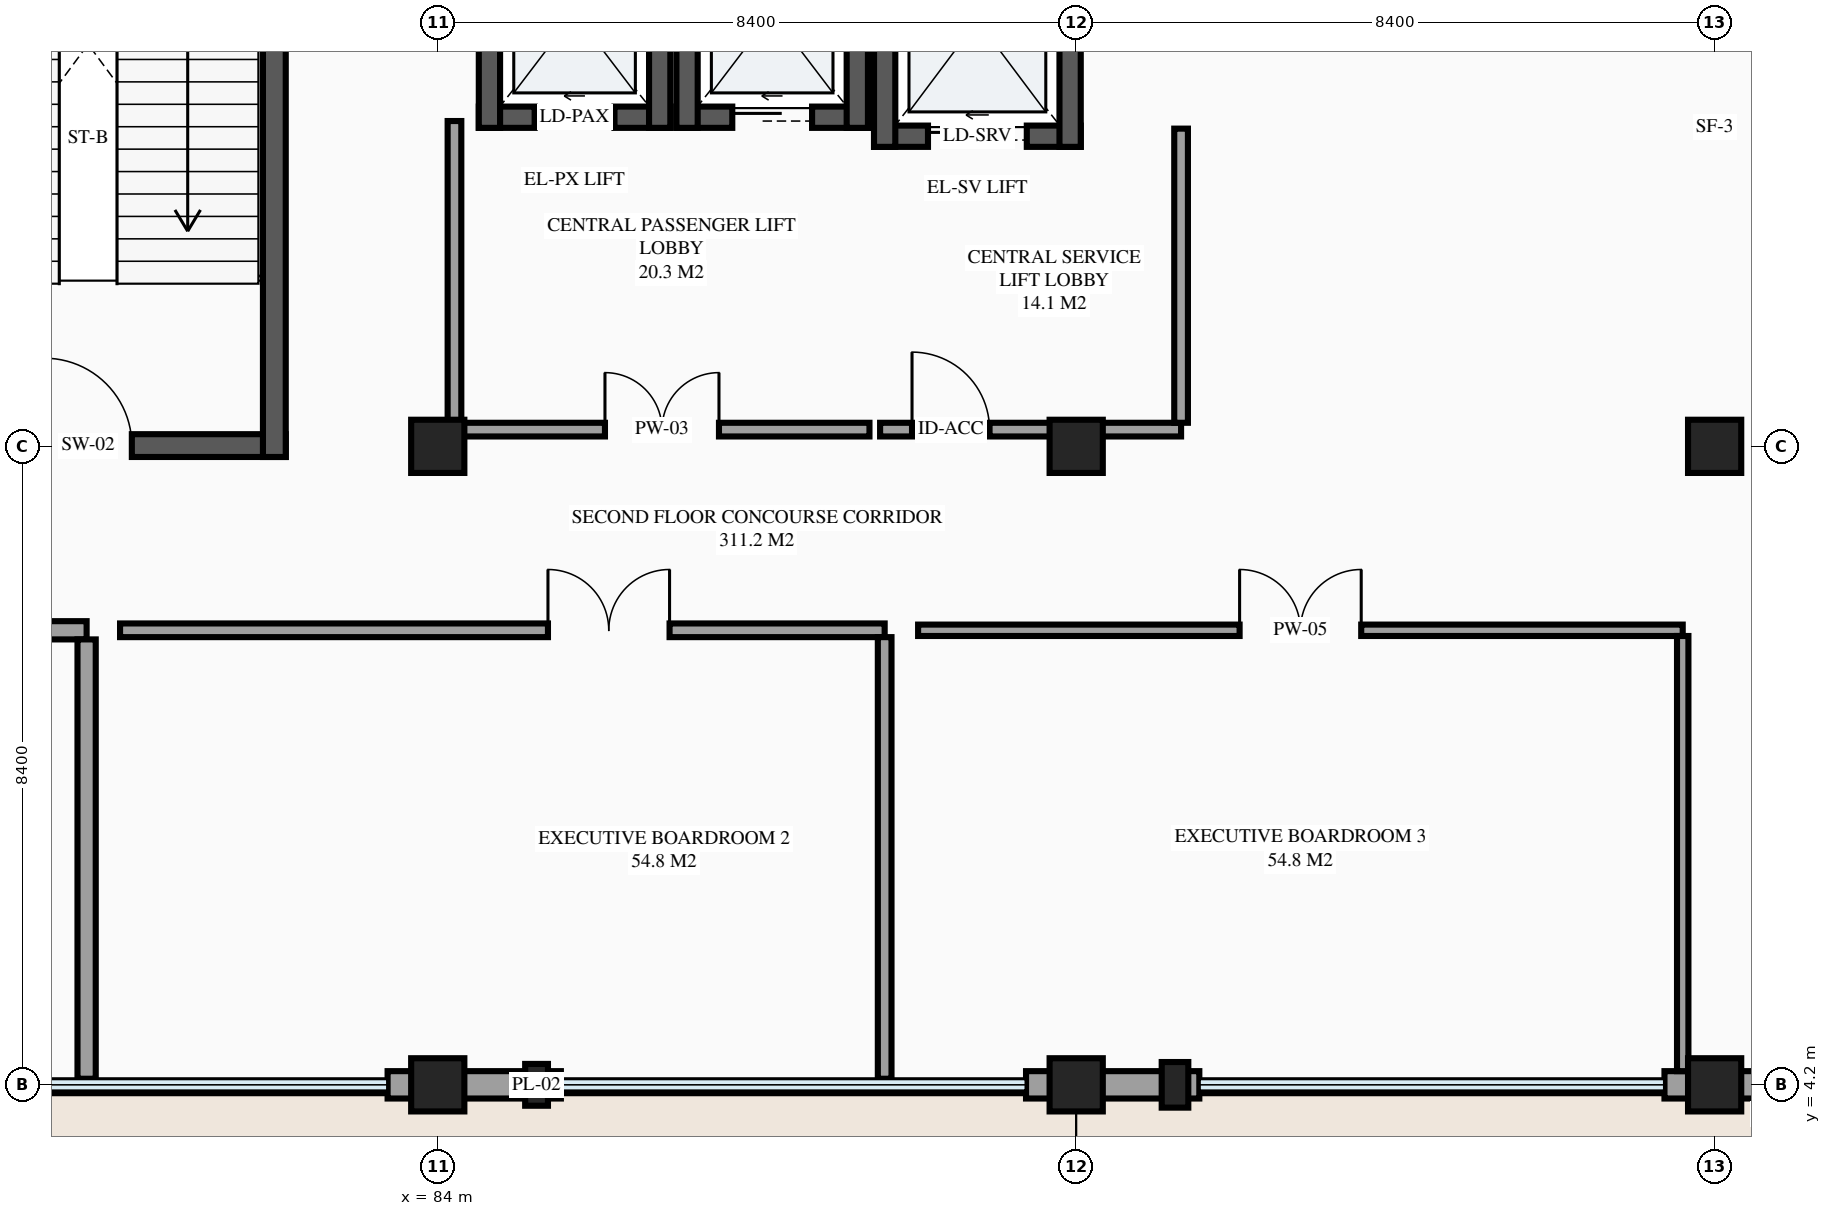
"""IFC4 building model, lengths in metres.
Left out: names, types, materials, properties, quantities, classifications, styles, units other than length and angle.
Written with IfcOpenShell. Run it as: python <this file> out.ifc"""

import sys

from ifc_helpers import new_model, si_unit, direction, frame, frame_2d, origin, origin_2d, place, context, subcontext, project, spatial, rectangle, extrude, element, fill, save


model = new_model("IFC4")
c1 = context("Model", 3, precision=1e-05, world=origin(), true_north=direction((0.0, 1.0)))
c2 = subcontext(c1, "Body", "Model", "MODEL_VIEW")
j1 = project(units=[si_unit("LENGTHUNIT", "METRE"), si_unit("PLANEANGLEUNIT", "RADIAN")], contexts=[c1])
p1 = place(None, origin())
s1 = spatial("IfcSite", under=j1, at=p1, CompositionType="ELEMENT")
p2 = place(p1, origin())
s2 = spatial("IfcBuilding", under=s1, at=p2, CompositionType="ELEMENT")
p3 = place(p2, frame((0.0, 0.0, 9.9)))
s3 = spatial("IfcBuildingStorey", under=s2, at=p3, CompositionType="ELEMENT", Elevation=9.9)
for number, where, z_axis, x_axis in (
    (1, (84.0, 4.2, 0.0), (0.0, 0.0, 1.0), (1.0, 0.0, 0.0)),
    (2, (84.0, 12.6, 0.0), (0.0, 0.0, 1.0), (1.0, 0.0, 0.0)),
    (3, (92.4, 4.2, 0.0), (0.0, 0.0, 1.0), (1.0, 0.0, 0.0)),
    (4, (92.4, 12.6, 0.0), (0.0, 0.0, 1.0), (1.0, 0.0, 0.0)),
    (5, (100.8, 4.2, 0.0), (0.0, 0.0, 1.0), (1.0, 0.0, 0.0)),
    (6, (100.8, 12.6, 0.0), (0.0, 0.0, 1.0), (1.0, 0.0, 0.0)),
):
    element("IfcColumn", number, at=place(p3, frame(where, z_axis=z_axis, x_axis=x_axis)), inside=s3, PredefinedType="COLUMN", context=c2, shape_type="SweptSolid", body=[
        extrude(rectangle(XDim=0.7, YDim=0.7, at=origin_2d()), origin(), (0.0, 0.0, 1.0), 4.2),
    ])
p4 = place(p3, frame((85.3, 4.2, 0.0), z_axis=(0.0, 0.0, 1.0), x_axis=(1.0, 0.0, 0.0)))
e7 = element("IfcColumn", 7, at=p4, inside=s3, PredefinedType="PILASTER", context=c2, shape_type="SweptSolid", body=[
    extrude(rectangle(XDim=0.3, YDim=0.55, at=origin_2d()), origin(), (0.0, 0.0, 1.0), 4.2),
])
p5 = place(p3, frame((93.7, 4.2, 0.0), z_axis=(0.0, 0.0, 1.0), x_axis=(1.0, 0.0, 0.0)))
e8 = element("IfcColumn", 8, at=p5, inside=s3, PredefinedType="PILASTER", context=c2, shape_type="SweptSolid", body=[
    extrude(rectangle(XDim=0.35, YDim=0.6, at=origin_2d()), origin(), (0.0, 0.0, 1.0), 4.2),
])
p6 = place(p3, frame((83.34, 4.2, 0.0), z_axis=(0.0, 0.0, 1.0), x_axis=(1.0, 0.0, 0.0)))
e9 = element("IfcWall", 9, at=p6, inside=s3, PredefinedType="STANDARD", context=c2, shape_type="SweptSolid", body=[
    extrude(rectangle(XDim=0.66, YDim=0.36, at=frame_2d((0.33, 0.0))), origin(), (0.0, 0.0, 1.0), 4.2),
])
p7 = place(p3, frame((84.0, 4.2, 0.0), z_axis=(0.0, 0.0, 1.0), x_axis=(1.0, 0.0, 0.0)))
e10 = element("IfcWall", 10, at=p7, inside=s3, PredefinedType="STANDARD", context=c2, shape_type="SweptSolid", body=[
    extrude(rectangle(XDim=1.62, YDim=0.36, at=frame_2d((0.81, 0.0))), origin(), (0.0, 0.0, 1.0), 3.21),
])
p8 = place(p3, frame((91.74, 4.2, 0.0), z_axis=(0.0, 0.0, 1.0), x_axis=(1.0, 0.0, 0.0)))
e11 = element("IfcWall", 11, at=p8, inside=s3, PredefinedType="STANDARD", context=c2, shape_type="SweptSolid", body=[
    extrude(rectangle(XDim=0.66, YDim=0.36, at=frame_2d((0.33, 0.0))), origin(), (0.0, 0.0, 1.0), 4.2),
])
p9 = place(p3, frame((92.4, 4.2, 0.0), z_axis=(0.0, 0.0, 1.0), x_axis=(1.0, 0.0, 0.0)))
e12 = element("IfcWall", 12, at=p9, inside=s3, PredefinedType="STANDARD", context=c2, shape_type="SweptSolid", body=[
    extrude(rectangle(XDim=1.62, YDim=0.36, at=frame_2d((0.81, 0.0))), origin(), (0.0, 0.0, 1.0), 3.65),
])
p10 = place(p3, frame((100.14, 4.2, 0.0), z_axis=(0.0, 0.0, 1.0), x_axis=(1.0, 0.0, 0.0)))
e13 = element("IfcWall", 13, at=p10, inside=s3, PredefinedType="STANDARD", context=c2, shape_type="SweptSolid", body=[
    extrude(rectangle(XDim=0.66, YDim=0.36, at=frame_2d((0.33, 0.0))), origin(), (0.0, 0.0, 1.0), 4.2),
])
p11 = place(p3, frame((100.8, 4.2, 0.0), z_axis=(0.0, 0.0, 1.0), x_axis=(1.0, 0.0, 0.0)))
e14 = element("IfcWall", 14, at=p11, inside=s3, PredefinedType="STANDARD", context=c2, shape_type="SweptSolid", body=[
    extrude(rectangle(XDim=8.4, YDim=0.36, at=frame_2d((4.2, 0.0))), origin(), (0.0, 0.0, 1.0), 3.431),
])
p12 = place(p11, frame((3.6, 0.0, 0.75)))
e15 = element("IfcOpeningElement", 15, at=p12, cuts=e14, PredefinedType="OPENING", context=c2, shape_type="SweptSolid", body=[
    extrude(rectangle(XDim=1.2, YDim=1.5, at=frame_2d((0.6, 0.75))), frame((0.0, 0.19, 0.0), z_axis=(0.0, -1.0, 0.0), x_axis=(1.0, 0.0, 0.0)), (0.0, 0.0, 1.0), 0.38),
])
p13 = place(p3, frame((84.54, 16.93, 0.0), z_axis=(0.0, 0.0, 1.0), x_axis=(1.0, 0.0, 0.0)))
e16 = element("IfcWall", 16, at=p13, inside=s3, PredefinedType="SHEAR", context=c2, shape_type="SweptSolid", body=[
    extrude(rectangle(XDim=2.52, YDim=0.28, at=frame_2d((1.26, 0.0))), origin(), (0.0, 0.0, 1.0), 4.2),
])
p14 = place(p13, frame((0.735, 0.0, 0.0)))
e17 = element("IfcOpeningElement", 17, at=p14, cuts=e16, PredefinedType="OPENING", context=c2, shape_type="SweptSolid", body=[
    extrude(rectangle(XDim=1.05, YDim=2.2, at=frame_2d((0.525, 1.1))), frame((0.0, 0.15, 0.0), z_axis=(0.0, -1.0, 0.0), x_axis=(1.0, 0.0, 0.0)), (0.0, 0.0, 1.0), 0.3),
])
for number, where, z_axis, x_axis in (
    (18, (86.92, 16.79, 0.0), (0.0, 0.0, 1.0), (0.0, 1.0, 0.0)),
    (19, (84.68, 19.81, 0.0), (0.0, 0.0, 1.0), (0.0, -1.0, 0.0)),
):
    element("IfcWall", number, at=place(p3, frame(where, z_axis=z_axis, x_axis=x_axis)), inside=s3, PredefinedType="SHEAR", context=c2, shape_type="SweptSolid", body=[
        extrude(rectangle(XDim=3.02, YDim=0.28, at=frame_2d((1.51, 0.0))), origin(), (0.0, 0.0, 1.0), 4.2),
    ])
p15 = place(p3, frame((87.14, 16.93, 0.0), z_axis=(0.0, 0.0, 1.0), x_axis=(1.0, 0.0, 0.0)))
e20 = element("IfcWall", 20, at=p15, inside=s3, PredefinedType="SHEAR", context=c2, shape_type="SweptSolid", body=[
    extrude(rectangle(XDim=2.52, YDim=0.28, at=frame_2d((1.26, 0.0))), origin(), (0.0, 0.0, 1.0), 4.2),
])
p16 = place(p15, frame((0.735, 0.0, 0.0)))
e21 = element("IfcOpeningElement", 21, at=p16, cuts=e20, PredefinedType="OPENING", context=c2, shape_type="SweptSolid", body=[
    extrude(rectangle(XDim=1.05, YDim=2.2, at=frame_2d((0.525, 1.1))), frame((0.0, 0.15, 0.0), z_axis=(0.0, -1.0, 0.0), x_axis=(1.0, 0.0, 0.0)), (0.0, 0.0, 1.0), 0.3),
])
for number, where, z_axis, x_axis in (
    (22, (89.52, 16.79, 0.0), (0.0, 0.0, 1.0), (0.0, 1.0, 0.0)),
    (23, (87.28, 19.81, 0.0), (0.0, 0.0, 1.0), (0.0, -1.0, 0.0)),
):
    element("IfcWall", number, at=place(p3, frame(where, z_axis=z_axis, x_axis=x_axis)), inside=s3, PredefinedType="SHEAR", context=c2, shape_type="SweptSolid", body=[
        extrude(rectangle(XDim=3.02, YDim=0.28, at=frame_2d((1.51, 0.0))), origin(), (0.0, 0.0, 1.0), 4.2),
    ])
p17 = place(p3, frame((89.74, 16.68, 0.0), z_axis=(0.0, 0.0, 1.0), x_axis=(1.0, 0.0, 0.0)))
e24 = element("IfcWall", 24, at=p17, inside=s3, PredefinedType="SHEAR", context=c2, shape_type="SweptSolid", body=[
    extrude(rectangle(XDim=2.72, YDim=0.28, at=frame_2d((1.36, 0.0))), origin(), (0.0, 0.0, 1.0), 4.2),
])
p18 = place(p17, frame((0.71, 0.0, 0.0)))
e25 = element("IfcOpeningElement", 25, at=p18, cuts=e24, PredefinedType="OPENING", context=c2, shape_type="SweptSolid", body=[
    extrude(rectangle(XDim=1.3, YDim=2.25, at=frame_2d((0.65, 1.125))), frame((0.0, 0.15, 0.0), z_axis=(0.0, -1.0, 0.0), x_axis=(1.0, 0.0, 0.0)), (0.0, 0.0, 1.0), 0.3),
])
for number, where, z_axis, x_axis in (
    (26, (92.32, 16.54, 0.0), (0.0, 0.0, 1.0), (0.0, 1.0, 0.0)),
    (27, (89.88, 19.86, 0.0), (0.0, 0.0, 1.0), (0.0, -1.0, 0.0)),
):
    element("IfcWall", number, at=place(p3, frame(where, z_axis=z_axis, x_axis=x_axis)), inside=s3, PredefinedType="SHEAR", context=c2, shape_type="SweptSolid", body=[
        extrude(rectangle(XDim=3.32, YDim=0.28, at=frame_2d((1.66, 0.0))), origin(), (0.0, 0.0, 1.0), 4.2),
    ])
p19 = place(p3, frame((76.8, 12.61, 0.0), z_axis=(0.0, 0.0, 1.0), x_axis=(1.0, 0.0, 0.0)))
e28 = element("IfcWall", 28, at=p19, inside=s3, PredefinedType="SHEAR", context=c2, shape_type="SweptSolid", body=[
    extrude(rectangle(XDim=5.2, YDim=0.3, at=frame_2d((2.6, 0.0))), origin(), (0.0, 0.0, 1.0), 4.2),
])
p20 = place(p19, frame((2.025, 0.0, 0.0)))
e29 = element("IfcOpeningElement", 29, at=p20, cuts=e28, PredefinedType="OPENING", context=c2, shape_type="SweptSolid", body=[
    extrude(rectangle(XDim=1.15, YDim=2.15, at=frame_2d((0.575, 1.075))), frame((0.0, 0.16, 0.0), z_axis=(0.0, -1.0, 0.0), x_axis=(1.0, 0.0, 0.0)), (0.0, 0.0, 1.0), 0.32),
])
p21 = place(p3, frame((81.85, 12.46, 0.0), z_axis=(0.0, 0.0, 1.0), x_axis=(0.0, 1.0, 0.0)))
e30 = element("IfcWall", 30, at=p21, inside=s3, PredefinedType="SHEAR", context=c2, shape_type="SweptSolid", body=[
    extrude(rectangle(XDim=8.84, YDim=0.3, at=frame_2d((4.42, 0.0))), origin(), (0.0, 0.0, 1.0), 4.2),
])
p22 = place(p3, frame((84.22, 12.82, 0.0), z_axis=(0.0, 0.0, 1.0), x_axis=(1.0, 0.0, 0.0)))
e31 = element("IfcWall", 31, at=p22, inside=s3, PredefinedType="PARTITIONING", context=c2, shape_type="SweptSolid", body=[
    extrude(rectangle(XDim=5.46, YDim=0.18, at=frame_2d((2.73, 0.0))), origin(), (0.0, 0.0, 1.0), 3.955),
])
p23 = place(p22, frame((1.98, 0.0, 0.0)))
e32 = element("IfcOpeningElement", 32, at=p23, cuts=e31, PredefinedType="OPENING", context=c2, shape_type="SweptSolid", body=[
    extrude(rectangle(XDim=1.5, YDim=2.15, at=frame_2d((0.75, 1.075))), frame((0.0, 0.1, 0.0), z_axis=(0.0, -1.0, 0.0), x_axis=(1.0, 0.0, 0.0)), (0.0, 0.0, 1.0), 0.2),
])
p24 = place(p3, frame((84.22, 12.91, 0.0), z_axis=(0.0, 0.0, 1.0), x_axis=(0.0, 1.0, 0.0)))
e33 = element("IfcWall", 33, at=p24, inside=s3, PredefinedType="PARTITIONING", context=c2, shape_type="SweptSolid", body=[
    extrude(rectangle(XDim=3.97, YDim=0.18, at=frame_2d((1.985, 0.0))), origin(), (0.0, 0.0, 1.0), 3.06),
])
p25 = place(p3, frame((89.82, 12.82, 0.0), z_axis=(0.0, 0.0, 1.0), x_axis=(1.0, 0.0, 0.0)))
e34 = element("IfcWall", 34, at=p25, inside=s3, PredefinedType="PARTITIONING", context=c2, shape_type="SweptSolid", body=[
    extrude(rectangle(XDim=3.96, YDim=0.18, at=frame_2d((1.98, 0.0))), origin(), (0.0, 0.0, 1.0), 3.955),
])
p26 = place(p25, frame((0.42, 0.0, 0.0)))
e35 = element("IfcOpeningElement", 35, at=p26, cuts=e34, PredefinedType="OPENING", context=c2, shape_type="SweptSolid", body=[
    extrude(rectangle(XDim=1.02, YDim=2.15, at=frame_2d((0.51, 1.075))), frame((0.0, 0.1, 0.0), z_axis=(0.0, -1.0, 0.0), x_axis=(1.0, 0.0, 0.0)), (0.0, 0.0, 1.0), 0.2),
])
p27 = place(p3, frame((93.78, 12.91, 0.0), z_axis=(0.0, 0.0, 1.0), x_axis=(0.0, 1.0, 0.0)))
e36 = element("IfcWall", 36, at=p27, inside=s3, PredefinedType="PARTITIONING", context=c2, shape_type="SweptSolid", body=[
    extrude(rectangle(XDim=3.87, YDim=0.18, at=frame_2d((1.935, 0.0))), origin(), (0.0, 0.0, 1.0), 3.955),
])
p28 = place(p3, frame((69.32, 10.18, 0.0), z_axis=(0.0, 0.0, 1.0), x_axis=(1.0, 0.0, 0.0)))
e37 = element("IfcWall", 37, at=p28, inside=s3, PredefinedType="PARTITIONING", context=c2, shape_type="SweptSolid", body=[
    extrude(rectangle(XDim=10.06, YDim=0.24, at=frame_2d((5.03, 0.0))), origin(), (0.0, 0.0, 1.0), 3.955),
])
p29 = place(p28, frame((3.18, 0.0, 0.0)))
e38 = element("IfcOpeningElement", 38, at=p29, cuts=e37, PredefinedType="OPENING", context=c2, shape_type="SweptSolid", body=[
    extrude(rectangle(XDim=1.6, YDim=2.25, at=frame_2d((0.8, 1.125))), frame((0.0, 0.13, 0.0), z_axis=(0.0, -1.0, 0.0), x_axis=(1.0, 0.0, 0.0)), (0.0, 0.0, 1.0), 0.26),
])
p30 = place(p3, frame((79.38, 4.28, 0.0), z_axis=(0.0, 0.0, 1.0), x_axis=(0.0, 1.0, 0.0)))
e39 = element("IfcWall", 39, at=p30, inside=s3, PredefinedType="PARTITIONING", context=c2, shape_type="SweptSolid", body=[
    extrude(rectangle(XDim=5.78, YDim=0.24, at=frame_2d((2.89, 0.0))), origin(), (0.0, 0.0, 1.0), 3.955),
])
p31 = place(p3, frame((79.82, 10.18, 0.0), z_axis=(0.0, 0.0, 1.0), x_axis=(1.0, 0.0, 0.0)))
e40 = element("IfcWall", 40, at=p31, inside=s3, PredefinedType="PARTITIONING", context=c2, shape_type="SweptSolid", body=[
    extrude(rectangle(XDim=10.06, YDim=0.18, at=frame_2d((5.03, 0.0))), origin(), (0.0, 0.0, 1.0), 3.955),
])
p32 = place(p31, frame((5.63, 0.0, 0.0)))
e41 = element("IfcOpeningElement", 41, at=p32, cuts=e40, PredefinedType="OPENING", context=c2, shape_type="SweptSolid", body=[
    extrude(rectangle(XDim=1.6, YDim=2.25, at=frame_2d((0.8, 1.125))), frame((0.0, 0.1, 0.0), z_axis=(0.0, -1.0, 0.0), x_axis=(1.0, 0.0, 0.0)), (0.0, 0.0, 1.0), 0.2),
])
p33 = place(p3, frame((89.88, 4.28, 0.0), z_axis=(0.0, 0.0, 1.0), x_axis=(0.0, 1.0, 0.0)))
e42 = element("IfcWall", 42, at=p33, inside=s3, PredefinedType="PARTITIONING", context=c2, shape_type="SweptSolid", body=[
    extrude(rectangle(XDim=5.81, YDim=0.18, at=frame_2d((2.905, 0.0))), origin(), (0.0, 0.0, 1.0), 3.955),
])
p34 = place(p3, frame((90.32, 10.18, 0.0), z_axis=(0.0, 0.0, 1.0), x_axis=(1.0, 0.0, 0.0)))
e43 = element("IfcWall", 43, at=p34, inside=s3, PredefinedType="PARTITIONING", context=c2, shape_type="SweptSolid", body=[
    extrude(rectangle(XDim=10.06, YDim=0.15, at=frame_2d((5.03, 0.0))), origin(), (0.0, 0.0, 1.0), 3.955),
])
p35 = place(p34, frame((4.23, 0.0, 0.0)))
e44 = element("IfcOpeningElement", 44, at=p35, cuts=e43, PredefinedType="OPENING", context=c2, shape_type="SweptSolid", body=[
    extrude(rectangle(XDim=1.6, YDim=2.25, at=frame_2d((0.8, 1.125))), frame((0.0, 0.085, 0.0), z_axis=(0.0, -1.0, 0.0), x_axis=(1.0, 0.0, 0.0)), (0.0, 0.0, 1.0), 0.17),
])
p36 = place(p3, frame((100.38, 4.38, 0.0), z_axis=(0.0, 0.0, 1.0), x_axis=(0.0, 1.0, 0.0)))
e45 = element("IfcWall", 45, at=p36, inside=s3, PredefinedType="PARTITIONING", context=c2, shape_type="SweptSolid", body=[
    extrude(rectangle(XDim=5.725, YDim=0.15, at=frame_2d((2.863, 0.0))), origin(), (0.0, 0.0, 1.0), 3.955),
])
p37 = place(p14, origin())
e46 = element("IfcDoor", 46, at=p37, inside=s3, OperationType="SLIDING_TO_LEFT", PredefinedType="DOOR", context=c2, shape_type="SweptSolid", body=[
    extrude(rectangle(XDim=1.05, YDim=2.2, at=frame_2d((0.525, 1.1))), frame((0.0, 0.025, 0.0), z_axis=(0.0, -1.0, 0.0), x_axis=(1.0, 0.0, 0.0)), (0.0, 0.0, 1.0), 0.05),
])
fill(e17, e46)
p38 = place(p16, origin())
e47 = element("IfcDoor", 47, at=p38, inside=s3, OperationType="SLIDING_TO_LEFT", PredefinedType="DOOR", context=c2, shape_type="SweptSolid", body=[
    extrude(rectangle(XDim=1.05, YDim=2.2, at=frame_2d((0.525, 1.1))), frame((0.0, 0.025, 0.0), z_axis=(0.0, -1.0, 0.0), x_axis=(1.0, 0.0, 0.0)), (0.0, 0.0, 1.0), 0.05),
])
fill(e21, e47)
p39 = place(p18, origin())
e48 = element("IfcDoor", 48, at=p39, inside=s3, OperationType="SLIDING_TO_LEFT", PredefinedType="DOOR", context=c2, shape_type="SweptSolid", body=[
    extrude(rectangle(XDim=1.3, YDim=2.25, at=frame_2d((0.65, 1.125))), frame((0.0, 0.025, 0.0), z_axis=(0.0, -1.0, 0.0), x_axis=(1.0, 0.0, 0.0)), (0.0, 0.0, 1.0), 0.05),
])
fill(e25, e48)
p40 = place(p20, origin())
e49 = element("IfcDoor", 49, at=p40, inside=s3, OperationType="SINGLE_SWING_LEFT", PredefinedType="DOOR", context=c2, shape_type="SweptSolid", body=[
    extrude(rectangle(XDim=1.15, YDim=2.15, at=frame_2d((0.575, 1.075))), frame((0.0, 0.025, 0.0), z_axis=(0.0, -1.0, 0.0), x_axis=(1.0, 0.0, 0.0)), (0.0, 0.0, 1.0), 0.05),
])
fill(e29, e49)
p41 = place(p23, origin())
e50 = element("IfcDoor", 50, at=p41, inside=s3, OperationType="DOUBLE_DOOR_SINGLE_SWING", PredefinedType="DOOR", context=c2, shape_type="SweptSolid", body=[
    extrude(rectangle(XDim=1.5, YDim=2.15, at=frame_2d((0.75, 1.075))), frame((0.0, 0.025, 0.0), z_axis=(0.0, -1.0, 0.0), x_axis=(1.0, 0.0, 0.0)), (0.0, 0.0, 1.0), 0.05),
])
fill(e32, e50)
p42 = place(p26, origin())
e51 = element("IfcDoor", 51, at=p42, inside=s3, OperationType="SINGLE_SWING_LEFT", PredefinedType="DOOR", context=c2, shape_type="SweptSolid", body=[
    extrude(rectangle(XDim=1.02, YDim=2.15, at=frame_2d((0.51, 1.075))), frame((0.0, 0.025, 0.0), z_axis=(0.0, -1.0, 0.0), x_axis=(1.0, 0.0, 0.0)), (0.0, 0.0, 1.0), 0.05),
])
fill(e35, e51)
p43 = place(p32, origin())
e52 = element("IfcDoor", 52, at=p43, inside=s3, OperationType="DOUBLE_DOOR_SINGLE_SWING", PredefinedType="DOOR", context=c2, shape_type="SweptSolid", body=[
    extrude(rectangle(XDim=1.6, YDim=2.25, at=frame_2d((0.8, 1.125))), frame((0.0, 0.025, 0.0), z_axis=(0.0, -1.0, 0.0), x_axis=(1.0, 0.0, 0.0)), (0.0, 0.0, 1.0), 0.05),
])
fill(e41, e52)
p44 = place(p35, origin())
e53 = element("IfcDoor", 53, at=p44, inside=s3, OperationType="DOUBLE_DOOR_SINGLE_SWING", PredefinedType="DOOR", context=c2, shape_type="SweptSolid", body=[
    extrude(rectangle(XDim=1.6, YDim=2.25, at=frame_2d((0.8, 1.125))), frame((0.0, 0.025, 0.0), z_axis=(0.0, -1.0, 0.0), x_axis=(1.0, 0.0, 0.0)), (0.0, 0.0, 1.0), 0.05),
])
fill(e44, e53)
save(model, sys.argv[1])
